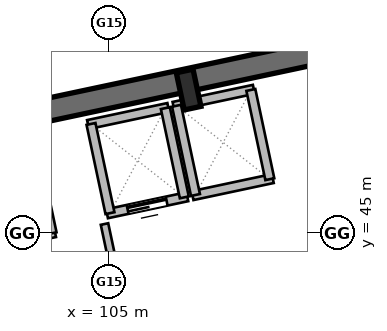
"""IFC4 building model, lengths in metres.
Left out: names, types, materials, properties, quantities, classifications, styles, units other than length and angle.
Written with IfcOpenShell. Run it as: python <this file> out.ifc"""

import sys

from ifc_helpers import new_model, si_unit, direction, frame, frame_2d, origin, origin_2d, place, context, subcontext, project, spatial, rectangle, i_section, extrude, element, fill, save


model = new_model("IFC4")
c1 = context("Model", 3, precision=1e-05, world=origin(), true_north=direction((0.0, 1.0)))
c2 = subcontext(c1, "Body", "Model", "MODEL_VIEW")
j1 = project(units=[si_unit("LENGTHUNIT", "METRE"), si_unit("PLANEANGLEUNIT", "RADIAN")], contexts=[c1])
p1 = place(None, origin())
s1 = spatial("IfcSite", under=j1, at=p1, CompositionType="ELEMENT")
p2 = place(p1, origin())
s2 = spatial("IfcBuilding", under=s1, at=p2, CompositionType="ELEMENT")
p3 = place(p2, frame((0.0, 0.0, 15.6)))
s3 = spatial("IfcBuildingStorey", under=s2, at=p3, CompositionType="ELEMENT", Elevation=15.6)
p4 = place(p3, frame((96.463, 46.77, 0.0), z_axis=(0.0, 0.0, 1.0), x_axis=(0.978147272959, 0.207913232873, 0.0)))
e1 = element("IfcWall", 1, at=p4, inside=s3, PredefinedType="SHEAR", context=c2, shape_type="SweptSolid", body=[
    extrude(rectangle(XDim=21.6, YDim=0.6, at=frame_2d((10.8, 0.0))), origin(), (0.0, 0.0, 1.0), 4.8),
])
p5 = place(p3, frame((107.079, 48.771, 0.0), z_axis=(0.0, 0.0, 1.0), x_axis=(0.978147600734, 0.207911690818, 0.0)))
e2 = element("IfcColumn", 2, at=p5, inside=s3, PredefinedType="COLUMN", context=c2, shape_type="SweptSolid", body=[
    extrude(i_section(OverallWidth=0.45, OverallDepth=1.0, WebThickness=0.022, FlangeThickness=0.04, at=origin_2d()), origin(), (0.0, 0.0, 1.0), 4.8),
])
p6 = place(p3, frame((106.186, 39.022, 0.0), z_axis=(0.0, 0.0, 1.0), x_axis=(-0.207916691923, 0.978146537703, 0.0)))
e3 = element("IfcWall", 3, at=p6, inside=s3, PredefinedType="PARTITIONING", context=c2, shape_type="SweptSolid", body=[
    extrude(rectangle(XDim=6.35, YDim=0.2, at=frame_2d((3.175, 0.0))), origin(), (0.0, 0.0, 1.0), 4.48),
])
p7 = place(p6, frame((2.8, 0.0, 0.0)))
e4 = element("IfcOpeningElement", 4, at=p7, cuts=e3, PredefinedType="OPENING", context=c2, shape_type="SweptSolid", body=[
    extrude(rectangle(XDim=1.05, YDim=2.1, at=frame_2d((0.525, 1.05))), frame((0.0, 0.11, 0.0), z_axis=(0.0, -1.0, 0.0), x_axis=(1.0, 0.0, 0.0)), (0.0, 0.0, 1.0), 0.22),
])
p8 = place(p3, frame((101.354, 44.538, 0.0), z_axis=(0.0, 0.0, 1.0), x_axis=(0.978141002414, 0.207942731049, 0.0)))
e5 = element("IfcWall", 5, at=p8, inside=s3, PredefinedType="PARTITIONING", context=c2, shape_type="SweptSolid", body=[
    extrude(rectangle(XDim=2.26, YDim=0.24, at=frame_2d((1.13, 0.0))), origin(), (0.0, 0.0, 1.0), 4.48),
])
p9 = place(p8, frame((0.655, 0.0, 0.0)))
e6 = element("IfcOpeningElement", 6, at=p9, cuts=e5, PredefinedType="OPENING", context=c2, shape_type="SweptSolid", body=[
    extrude(rectangle(XDim=0.95, YDim=2.15, at=frame_2d((0.475, 1.075))), frame((0.0, 0.13, 0.0), z_axis=(0.0, -1.0, 0.0), x_axis=(1.0, 0.0, 0.0)), (0.0, 0.0, 1.0), 0.26),
])
p10 = place(p3, frame((103.486, 44.992, 0.0), z_axis=(0.0, 0.0, 1.0), x_axis=(-0.207978798957, 0.978133334052, 0.0)))
e7 = element("IfcWall", 7, at=p10, inside=s3, PredefinedType="PARTITIONING", context=c2, shape_type="SweptSolid", body=[
    extrude(rectangle(XDim=2.7, YDim=0.24, at=frame_2d((1.35, 0.0))), origin(), (0.0, 0.0, 1.0), 4.48),
])
p11 = place(p3, frame((104.931, 45.503, 0.0), z_axis=(0.0, 0.0, 1.0), x_axis=(0.97813528961, 0.207969601673, 0.0)))
e8 = element("IfcWall", 8, at=p11, inside=s3, PredefinedType="PARTITIONING", context=c2, shape_type="SweptSolid", body=[
    extrude(rectangle(XDim=2.16, YDim=0.24, at=frame_2d((1.08, 0.0))), origin(), (0.0, 0.0, 1.0), 4.48),
])
p12 = place(p11, frame((0.555, 0.0, 0.0)))
e9 = element("IfcOpeningElement", 9, at=p12, cuts=e8, PredefinedType="OPENING", context=c2, shape_type="SweptSolid", body=[
    extrude(rectangle(XDim=1.05, YDim=2.15, at=frame_2d((0.525, 1.075))), frame((0.0, 0.13, 0.0), z_axis=(0.0, -1.0, 0.0), x_axis=(1.0, 0.0, 0.0)), (0.0, 0.0, 1.0), 0.26),
])
p13 = place(p3, frame((104.432, 47.851, 0.0), z_axis=(0.0, 0.0, 1.0), x_axis=(0.978158276388, 0.207861459473, 0.0)))
e10 = element("IfcWall", 10, at=p13, inside=s3, PredefinedType="PARTITIONING", context=c2, shape_type="SweptSolid", body=[
    extrude(rectangle(XDim=2.16, YDim=0.24, at=frame_2d((1.08, 0.0))), origin(), (0.0, 0.0, 1.0), 4.48),
])
p14 = place(p3, frame((105.01, 45.52, 0.0), z_axis=(0.0, 0.0, 1.0), x_axis=(-0.207917150959, 0.978146440129, 0.0)))
e11 = element("IfcWall", 11, at=p14, inside=s3, PredefinedType="PARTITIONING", context=c2, shape_type="SweptSolid", body=[
    extrude(rectangle(XDim=2.4, YDim=0.24, at=frame_2d((1.2, 0.0))), origin(), (0.0, 0.0, 1.0), 4.48),
])
p15 = place(p3, frame((106.966, 45.936, 0.0), z_axis=(0.0, 0.0, 1.0), x_axis=(-0.207937840262, 0.978142042133, 0.0)))
e12 = element("IfcWall", 12, at=p15, inside=s3, PredefinedType="PARTITIONING", context=c2, shape_type="SweptSolid", body=[
    extrude(rectangle(XDim=2.4, YDim=0.24, at=frame_2d((1.2, 0.0))), origin(), (0.0, 0.0, 1.0), 4.48),
])
for number, where, z_axis, x_axis in (
    (13, (107.181, 45.981, 0.0), (0.0, 0.0, 1.0), (0.978, 0.208, 0.0)),
    (14, (106.682, 48.329, 0.0), (0.0, 0.0, 1.0), (0.978, 0.208, 0.0)),
):
    element("IfcWall", number, at=place(p3, frame(where, z_axis=z_axis, x_axis=x_axis)), inside=s3, PredefinedType="PARTITIONING", context=c2, shape_type="SweptSolid", body=[
        extrude(rectangle(XDim=2.16, YDim=0.24, at=frame_2d((1.08, 0.0))), origin(), (0.0, 0.0, 1.0), 4.48),
    ])
for number, where, z_axis, x_axis in (
    (15, (107.26, 45.998, 0.0), (0.0, 0.0, 1.0), (-0.208, 0.978, 0.0)),
    (16, (109.216, 46.414, 0.0), (0.0, 0.0, 1.0), (-0.208, 0.978, 0.0)),
):
    element("IfcWall", number, at=place(p3, frame(where, z_axis=z_axis, x_axis=x_axis)), inside=s3, PredefinedType="PARTITIONING", context=c2, shape_type="SweptSolid", body=[
        extrude(rectangle(XDim=2.4, YDim=0.24, at=frame_2d((1.2, 0.0))), origin(), (0.0, 0.0, 1.0), 4.48),
    ])
p16 = place(p3, frame((109.682, 43.497, 0.0), z_axis=(0.0, 0.0, 1.0), x_axis=(0.978149238447, 0.207903985835, 0.0)))
e17 = element("IfcWall", 17, at=p16, inside=s3, PredefinedType="PARTITIONING", context=c2, shape_type="SweptSolid", body=[
    extrude(rectangle(XDim=5.1, YDim=0.16, at=frame_2d((2.55, 0.0))), origin(), (0.0, 0.0, 1.0), 4.48),
])
p17 = place(p16, frame((0.81, 0.0, 0.0)))
e18 = element("IfcOpeningElement", 18, at=p17, cuts=e17, PredefinedType="OPENING", context=c2, shape_type="SweptSolid", body=[
    extrude(rectangle(XDim=0.85, YDim=2.05, at=frame_2d((0.425, 1.025))), frame((0.0, 0.09, 0.0), z_axis=(0.0, -1.0, 0.0), x_axis=(1.0, 0.0, 0.0)), (0.0, 0.0, 1.0), 0.18),
])
p18 = place(p16, frame((3.18, 0.0, 0.0)))
e19 = element("IfcOpeningElement", 19, at=p18, cuts=e17, PredefinedType="OPENING", context=c2, shape_type="SweptSolid", body=[
    extrude(rectangle(XDim=0.85, YDim=2.05, at=frame_2d((0.425, 1.025))), frame((0.0, 0.09, 0.0), z_axis=(0.0, -1.0, 0.0), x_axis=(1.0, 0.0, 0.0)), (0.0, 0.0, 1.0), 0.18),
])
p19 = place(p12, origin())
e20 = element("IfcDoor", 20, at=p19, inside=s3, OperationType="SLIDING_TO_LEFT", PredefinedType="DOOR", context=c2, shape_type="SweptSolid", body=[
    extrude(rectangle(XDim=1.05, YDim=2.15, at=frame_2d((0.525, 1.075))), frame((0.0, 0.025, 0.0), z_axis=(0.0, -1.0, 0.0), x_axis=(1.0, 0.0, 0.0)), (0.0, 0.0, 1.0), 0.05),
])
fill(e9, e20)
save(model, sys.argv[1])
